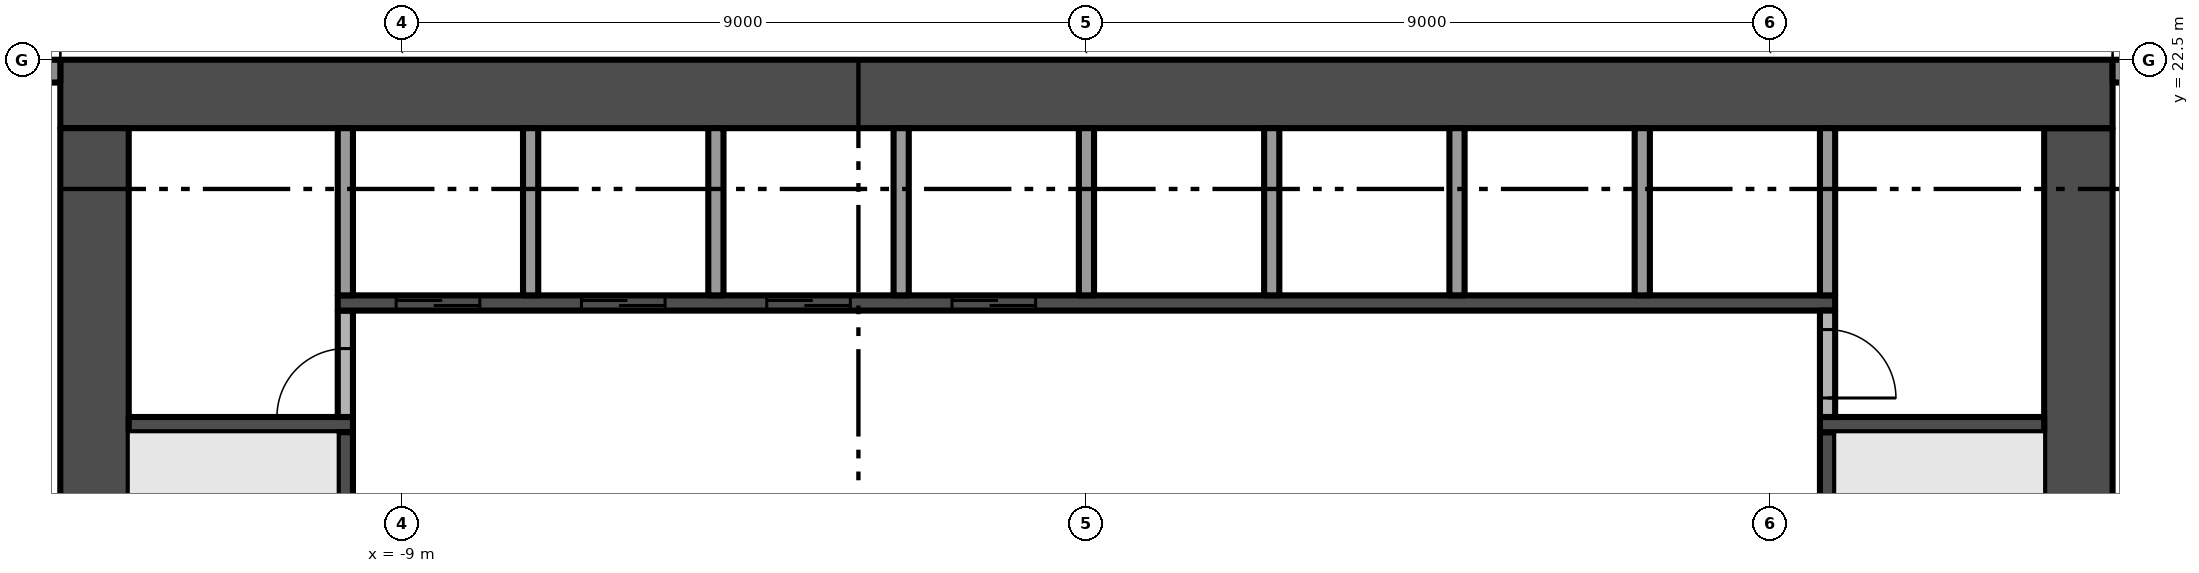
"""IFC4 building model, lengths in metres.
Left out: names, types, materials, properties, quantities, classifications, styles, units other than length and angle.
Written with IfcOpenShell. Run it as: python <this file> out.ifc"""

import sys

from ifc_helpers import new_model, si_unit, direction, frame, frame_2d, origin, place, context, subcontext, project, spatial, rectangle, extrude, element, fill, save


model = new_model("IFC4")
c1 = context("Model", 3, precision=1e-05, world=origin(), true_north=direction((0.0, 1.0)))
c2 = subcontext(c1, "Body", "Model", "MODEL_VIEW")
j1 = project(units=[si_unit("LENGTHUNIT", "METRE"), si_unit("PLANEANGLEUNIT", "RADIAN")], contexts=[c1])
p1 = place(None, origin())
s1 = spatial("IfcSite", under=j1, at=p1, CompositionType="ELEMENT")
p2 = place(p1, origin())
s2 = spatial("IfcBuilding", under=s1, at=p2, CompositionType="ELEMENT")
p3 = place(p2, frame((0.0, 0.0, 34.0)))
s3 = spatial("IfcBuildingStorey", under=s2, at=p3, CompositionType="ELEMENT", Elevation=34.0)
p4 = place(p3, frame((13.05, 5.4, -0.3), z_axis=(0.0, 0.0, 1.0), x_axis=(0.0, 1.0, 0.0)))
e1 = element("IfcWall", 1, at=p4, inside=s3, PredefinedType="SHEAR", context=c2, shape_type="SweptSolid", body=[
    extrude(rectangle(XDim=16.2, YDim=0.9, at=frame_2d((8.1, 0.0))), origin(), (0.0, 0.0, 1.0), 3.8),
])
p5 = place(p4, frame((6.0, 0.0, 0.3)))
e2 = element("IfcOpeningElement", 2, at=p5, cuts=e1, PredefinedType="OPENING", context=c2, shape_type="SweptSolid", body=[
    extrude(rectangle(XDim=1.2, YDim=2.2, at=frame_2d((0.6, 1.1))), frame((0.0, 0.46, 0.0), z_axis=(0.0, -1.0, 0.0), x_axis=(1.0, 0.0, 0.0)), (0.0, 0.0, 1.0), 0.92),
])
p6 = place(p3, frame((13.5, 22.05, -0.3), z_axis=(0.0, 0.0, 1.0), x_axis=(-1.0, 0.0, 0.0)))
e3 = element("IfcWall", 3, at=p6, inside=s3, PredefinedType="SHEAR", context=c2, shape_type="SweptSolid", body=[
    extrude(rectangle(XDim=27.0, YDim=0.9, at=frame_2d((13.5, 0.0))), origin(), (0.0, 0.0, 1.0), 3.8),
])
p7 = place(p3, frame((-13.05, 21.6, -0.3), z_axis=(0.0, 0.0, 1.0), x_axis=(0.0, -1.0, 0.0)))
e4 = element("IfcWall", 4, at=p7, inside=s3, PredefinedType="SHEAR", context=c2, shape_type="SweptSolid", body=[
    extrude(rectangle(XDim=16.2, YDim=0.9, at=frame_2d((8.1, 0.0))), origin(), (0.0, 0.0, 1.0), 3.8),
])
p8 = place(p7, frame((9.0, 0.0, 0.3)))
e5 = element("IfcOpeningElement", 5, at=p8, cuts=e4, PredefinedType="OPENING", context=c2, shape_type="SweptSolid", body=[
    extrude(rectangle(XDim=1.2, YDim=2.2, at=frame_2d((0.6, 1.1))), frame((0.0, 0.46, 0.0), z_axis=(0.0, -1.0, 0.0), x_axis=(1.0, 0.0, 0.0)), (0.0, 0.0, 1.0), 0.92),
])
p9 = place(p3, frame((13.5, 22.35, 0.0), z_axis=(0.0, 0.0, 1.0), x_axis=(1.0, 0.0, 0.0)))
e6 = element("IfcWall", 6, at=p9, inside=s3, PredefinedType="SOLIDWALL", context=c2, shape_type="SweptSolid", body=[
    extrude(rectangle(XDim=3.775, YDim=0.3, at=frame_2d((1.887, 0.0))), origin(), (0.0, 0.0, 1.0), 3.5),
])
p10 = place(p9, frame((0.85, 0.0, 0.0)))
e7 = element("IfcOpeningElement", 7, at=p10, cuts=e6, PredefinedType="OPENING", context=c2, shape_type="SweptSolid", body=[
    extrude(rectangle(XDim=2.6, YDim=2.4, at=frame_2d((1.3, 1.2))), frame((0.0, 0.16, 0.0), z_axis=(0.0, -1.0, 0.0), x_axis=(1.0, 0.0, 0.0)), (0.0, 0.0, 1.0), 0.32),
])
p11 = place(p3, frame((-17.275, 22.35, 0.0), z_axis=(0.0, 0.0, 1.0), x_axis=(1.0, 0.0, 0.0)))
e8 = element("IfcWall", 8, at=p11, inside=s3, PredefinedType="SOLIDWALL", context=c2, shape_type="SweptSolid", body=[
    extrude(rectangle(XDim=3.775, YDim=0.3, at=frame_2d((1.887, 0.0))), origin(), (0.0, 0.0, 1.0), 3.5),
])
p12 = place(p11, frame((0.325, 0.0, 0.45)))
e9 = element("IfcOpeningElement", 9, at=p12, cuts=e8, PredefinedType="OPENING", context=c2, shape_type="SweptSolid", body=[
    extrude(rectangle(XDim=2.6, YDim=2.65, at=frame_2d((1.3, 1.325))), frame((0.0, 0.16, 0.0), z_axis=(0.0, -1.0, 0.0), x_axis=(1.0, 0.0, 0.0)), (0.0, 0.0, 1.0), 0.32),
])
p13 = place(p3, frame((-12.6, 17.7, 0.0), z_axis=(0.0, 0.0, 1.0), x_axis=(1.0, 0.0, 0.0)))
e10 = element("IfcWall", 10, at=p13, inside=s3, PredefinedType="SHEAR", context=c2, shape_type="SweptSolid", body=[
    extrude(rectangle(XDim=2.95, YDim=0.2, at=frame_2d((1.475, 0.0))), origin(), (0.0, 0.0, 1.0), 3.5),
])
p14 = place(p3, frame((-9.75, 16.1, 0.0), z_axis=(0.0, 0.0, 1.0), x_axis=(0.0, 1.0, 0.0)))
e11 = element("IfcWall", 11, at=p14, inside=s3, PredefinedType="SHEAR", context=c2, shape_type="SweptSolid", body=[
    extrude(rectangle(XDim=1.5, YDim=0.2, at=frame_2d((0.75, 0.0))), origin(), (0.0, 0.0, 1.0), 3.5),
])
p15 = place(p3, frame((-9.75, 17.8, 0.0), z_axis=(0.0, 0.0, 1.0), x_axis=(0.0, 1.0, 0.0)))
e12 = element("IfcWall", 12, at=p15, inside=s3, PredefinedType="PARTITIONING", context=c2, shape_type="SweptSolid", body=[
    extrude(rectangle(XDim=1.4, YDim=0.2, at=frame_2d((0.7, 0.0))), origin(), (0.0, 0.0, 1.0), 3.5),
])
p16 = place(p15, origin())
e13 = element("IfcOpeningElement", 13, at=p16, cuts=e12, PredefinedType="OPENING", context=c2, shape_type="SweptSolid", body=[
    extrude(rectangle(XDim=0.9, YDim=2.1, at=frame_2d((0.45, 1.05))), frame((0.0, 0.11, 0.0), z_axis=(0.0, -1.0, 0.0), x_axis=(1.0, 0.0, 0.0)), (0.0, 0.0, 1.0), 0.22),
])
p17 = place(p3, frame((-9.85, 19.3, 0.0), z_axis=(0.0, 0.0, 1.0), x_axis=(1.0, 0.0, 0.0)))
e14 = element("IfcWall", 14, at=p17, inside=s3, PredefinedType="SHEAR", context=c2, shape_type="SweptSolid", body=[
    extrude(rectangle(XDim=19.7, YDim=0.2, at=frame_2d((9.85, 0.0))), origin(), (0.0, 0.0, 1.0), 3.5),
])
p18 = place(p17, frame((0.769, 0.0, 0.0)))
e15 = element("IfcOpeningElement", 15, at=p18, cuts=e14, PredefinedType="OPENING", context=c2, shape_type="SweptSolid", body=[
    extrude(rectangle(XDim=1.1, YDim=2.1, at=frame_2d((0.55, 1.05))), frame((0.0, 0.11, 0.0), z_axis=(0.0, -1.0, 0.0), x_axis=(1.0, 0.0, 0.0)), (0.0, 0.0, 1.0), 0.22),
])
p19 = place(p17, frame((3.206, 0.0, 0.0)))
e16 = element("IfcOpeningElement", 16, at=p19, cuts=e14, PredefinedType="OPENING", context=c2, shape_type="SweptSolid", body=[
    extrude(rectangle(XDim=1.1, YDim=2.1, at=frame_2d((0.55, 1.05))), frame((0.0, 0.11, 0.0), z_axis=(0.0, -1.0, 0.0), x_axis=(1.0, 0.0, 0.0)), (0.0, 0.0, 1.0), 0.22),
])
p20 = place(p17, frame((5.644, 0.0, 0.0)))
e17 = element("IfcOpeningElement", 17, at=p20, cuts=e14, PredefinedType="OPENING", context=c2, shape_type="SweptSolid", body=[
    extrude(rectangle(XDim=1.1, YDim=2.1, at=frame_2d((0.55, 1.05))), frame((0.0, 0.11, 0.0), z_axis=(0.0, -1.0, 0.0), x_axis=(1.0, 0.0, 0.0)), (0.0, 0.0, 1.0), 0.22),
])
p21 = place(p17, frame((8.081, 0.0, 0.0)))
e18 = element("IfcOpeningElement", 18, at=p21, cuts=e14, PredefinedType="OPENING", context=c2, shape_type="SweptSolid", body=[
    extrude(rectangle(XDim=1.1, YDim=2.1, at=frame_2d((0.55, 1.05))), frame((0.0, 0.11, 0.0), z_axis=(0.0, -1.0, 0.0), x_axis=(1.0, 0.0, 0.0)), (0.0, 0.0, 1.0), 0.22),
])
for number, where, z_axis, x_axis in (
    (19, (-9.75, 19.4, 0.0), (0.0, 0.0, 1.0), (0.0, 1.0, 0.0)),
    (20, (-7.312, 19.4, 0.0), (0.0, 0.0, 1.0), (0.0, 1.0, 0.0)),
    (21, (-4.875, 19.4, 0.0), (0.0, 0.0, 1.0), (0.0, 1.0, 0.0)),
    (22, (-2.438, 19.4, 0.0), (0.0, 0.0, 1.0), (0.0, 1.0, 0.0)),
    (23, (0.0, 19.4, 0.0), (0.0, 0.0, 1.0), (0.0, 1.0, 0.0)),
    (24, (2.438, 19.4, 0.0), (0.0, 0.0, 1.0), (0.0, 1.0, 0.0)),
    (25, (4.875, 19.4, 0.0), (0.0, 0.0, 1.0), (0.0, 1.0, 0.0)),
    (26, (7.312, 19.4, 0.0), (0.0, 0.0, 1.0), (0.0, 1.0, 0.0)),
):
    element("IfcWall", number, at=place(p3, frame(where, z_axis=z_axis, x_axis=x_axis)), inside=s3, PredefinedType="PARTITIONING", context=c2, shape_type="SweptSolid", body=[
        extrude(rectangle(XDim=2.2, YDim=0.2, at=frame_2d((1.1, 0.0))), origin(), (0.0, 0.0, 1.0), 3.5),
    ])
p22 = place(p3, frame((9.75, 16.1, 0.0), z_axis=(0.0, 0.0, 1.0), x_axis=(0.0, 1.0, 0.0)))
e27 = element("IfcWall", 27, at=p22, inside=s3, PredefinedType="SHEAR", context=c2, shape_type="SweptSolid", body=[
    extrude(rectangle(XDim=1.5, YDim=0.2, at=frame_2d((0.75, 0.0))), origin(), (0.0, 0.0, 1.0), 3.5),
])
p23 = place(p3, frame((9.65, 17.7, 0.0), z_axis=(0.0, 0.0, 1.0), x_axis=(1.0, 0.0, 0.0)))
e28 = element("IfcWall", 28, at=p23, inside=s3, PredefinedType="SHEAR", context=c2, shape_type="SweptSolid", body=[
    extrude(rectangle(XDim=2.95, YDim=0.2, at=frame_2d((1.475, 0.0))), origin(), (0.0, 0.0, 1.0), 3.5),
])
p24 = place(p3, frame((9.75, 19.2, 0.0), z_axis=(0.0, 0.0, 1.0), x_axis=(0.0, -1.0, 0.0)))
e29 = element("IfcWall", 29, at=p24, inside=s3, PredefinedType="PARTITIONING", context=c2, shape_type="SweptSolid", body=[
    extrude(rectangle(XDim=1.4, YDim=0.2, at=frame_2d((0.7, 0.0))), origin(), (0.0, 0.0, 1.0), 3.5),
])
p25 = place(p24, frame((0.25, 0.0, 0.0)))
e30 = element("IfcOpeningElement", 30, at=p25, cuts=e29, PredefinedType="OPENING", context=c2, shape_type="SweptSolid", body=[
    extrude(rectangle(XDim=0.9, YDim=2.1, at=frame_2d((0.45, 1.05))), frame((0.0, 0.11, 0.0), z_axis=(0.0, -1.0, 0.0), x_axis=(1.0, 0.0, 0.0)), (0.0, 0.0, 1.0), 0.22),
])
p26 = place(p3, frame((9.75, 19.4, 0.0), z_axis=(0.0, 0.0, 1.0), x_axis=(0.0, 1.0, 0.0)))
e31 = element("IfcWall", 31, at=p26, inside=s3, PredefinedType="PARTITIONING", context=c2, shape_type="SweptSolid", body=[
    extrude(rectangle(XDim=2.2, YDim=0.2, at=frame_2d((1.1, 0.0))), origin(), (0.0, 0.0, 1.0), 3.5),
])
p27 = place(p18, origin())
e32 = element("IfcDoor", 32, at=p27, inside=s3, OperationType="SLIDING_TO_LEFT", PredefinedType="DOOR", context=c2, shape_type="SweptSolid", body=[
    extrude(rectangle(XDim=1.1, YDim=2.1, at=frame_2d((0.55, 1.05))), frame((0.0, 0.025, 0.0), z_axis=(0.0, -1.0, 0.0), x_axis=(1.0, 0.0, 0.0)), (0.0, 0.0, 1.0), 0.05),
])
fill(e15, e32)
p28 = place(p19, origin())
e33 = element("IfcDoor", 33, at=p28, inside=s3, OperationType="SLIDING_TO_LEFT", PredefinedType="DOOR", context=c2, shape_type="SweptSolid", body=[
    extrude(rectangle(XDim=1.1, YDim=2.1, at=frame_2d((0.55, 1.05))), frame((0.0, 0.025, 0.0), z_axis=(0.0, -1.0, 0.0), x_axis=(1.0, 0.0, 0.0)), (0.0, 0.0, 1.0), 0.05),
])
fill(e16, e33)
p29 = place(p20, origin())
e34 = element("IfcDoor", 34, at=p29, inside=s3, OperationType="SLIDING_TO_LEFT", PredefinedType="DOOR", context=c2, shape_type="SweptSolid", body=[
    extrude(rectangle(XDim=1.1, YDim=2.1, at=frame_2d((0.55, 1.05))), frame((0.0, 0.025, 0.0), z_axis=(0.0, -1.0, 0.0), x_axis=(1.0, 0.0, 0.0)), (0.0, 0.0, 1.0), 0.05),
])
fill(e17, e34)
p30 = place(p21, origin())
e35 = element("IfcDoor", 35, at=p30, inside=s3, OperationType="SLIDING_TO_LEFT", PredefinedType="DOOR", context=c2, shape_type="SweptSolid", body=[
    extrude(rectangle(XDim=1.1, YDim=2.1, at=frame_2d((0.55, 1.05))), frame((0.0, 0.025, 0.0), z_axis=(0.0, -1.0, 0.0), x_axis=(1.0, 0.0, 0.0)), (0.0, 0.0, 1.0), 0.05),
])
fill(e18, e35)
p31 = place(p16, origin())
e36 = element("IfcDoor", 36, at=p31, inside=s3, OperationType="SINGLE_SWING_LEFT", PredefinedType="DOOR", context=c2, shape_type="SweptSolid", body=[
    extrude(rectangle(XDim=0.9, YDim=2.1, at=frame_2d((0.45, 1.05))), frame((0.0, 0.025, 0.0), z_axis=(0.0, -1.0, 0.0), x_axis=(1.0, 0.0, 0.0)), (0.0, 0.0, 1.0), 0.05),
])
fill(e13, e36)
p32 = place(p25, origin())
e37 = element("IfcDoor", 37, at=p32, inside=s3, OperationType="SINGLE_SWING_RIGHT", PredefinedType="DOOR", context=c2, shape_type="SweptSolid", body=[
    extrude(rectangle(XDim=0.9, YDim=2.1, at=frame_2d((0.45, 1.05))), frame((0.0, 0.025, 0.0), z_axis=(0.0, -1.0, 0.0), x_axis=(1.0, 0.0, 0.0)), (0.0, 0.0, 1.0), 0.05),
])
fill(e30, e37)
save(model, sys.argv[1])
